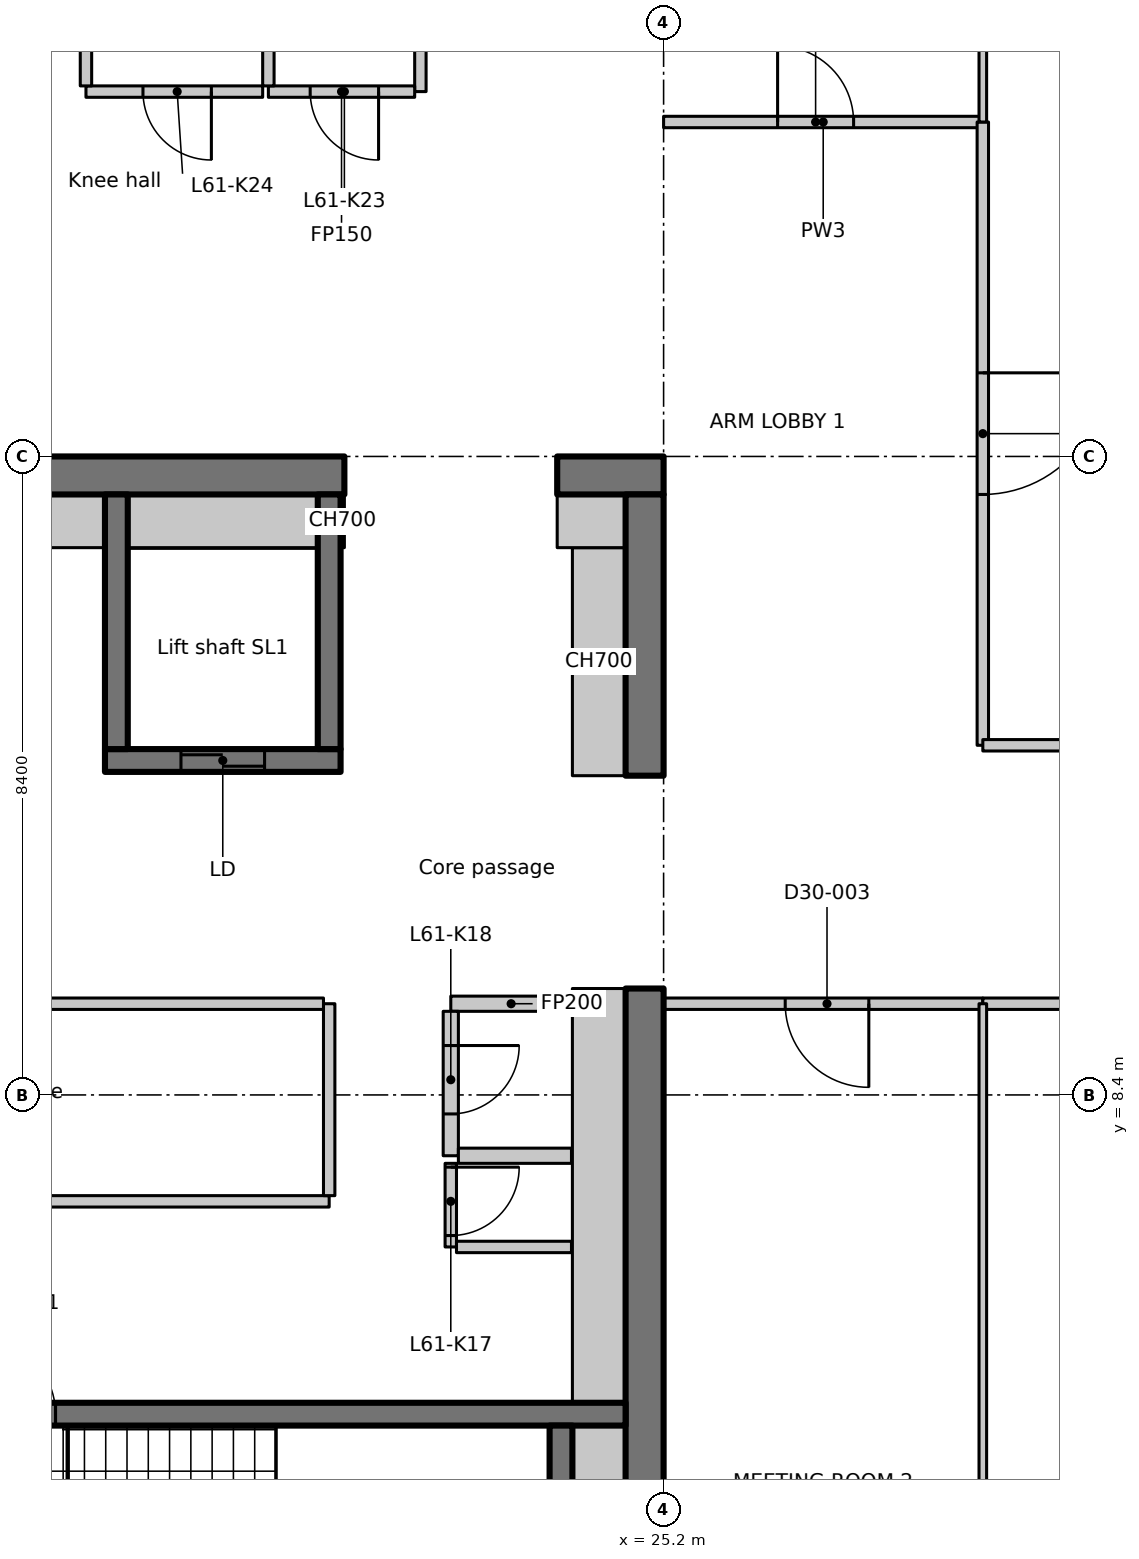
"""IFC4 building model, lengths in metres.
Left out: names, types, materials, properties, quantities, classifications, styles, units other than length and angle.
Written with IfcOpenShell. Run it as: python <this file> out.ifc"""

import sys

from ifc_helpers import new_model, si_unit, direction, frame, frame_2d, origin, place, context, subcontext, project, spatial, polyline, rectangle, outline, extrude, element, fill, save


model = new_model("IFC4")
c1 = context("Model", 3, precision=1e-05, world=origin(), true_north=direction((0.0, 1.0)))
c2 = subcontext(c1, "Body", "Model", "MODEL_VIEW")
j1 = project(units=[si_unit("LENGTHUNIT", "METRE"), si_unit("PLANEANGLEUNIT", "RADIAN")], contexts=[c1])
p1 = place(None, origin())
s1 = spatial("IfcSite", under=j1, at=p1, CompositionType="ELEMENT")
p2 = place(p1, origin())
s2 = spatial("IfcBuilding", under=s1, at=p2, CompositionType="ELEMENT")
p3 = place(p2, frame((0.0, 0.0, 240.9)))
s3 = spatial("IfcBuildingStorey", under=s2, at=p3, CompositionType="ELEMENT", Elevation=240.9)
p4 = place(p3, frame((-1.1, 16.55, 0.0), z_axis=(0.0, 0.0, 1.0), x_axis=(1.0, 0.0, 0.0)))
e1 = element("IfcWall", 1, at=p4, inside=s3, PredefinedType="SHEAR", context=c2, shape_type="SweptSolid", body=[
    extrude(rectangle(XDim=22.1, YDim=0.5, at=frame_2d((11.05, 0.0))), origin(), (0.0, 0.0, 1.0), 3.35),
])
p5 = place(p4, frame((3.15, 0.0, 0.0)))
e2 = element("IfcOpeningElement", 2, at=p5, cuts=e1, PredefinedType="OPENING", context=c2, shape_type="SweptSolid", body=[
    extrude(rectangle(XDim=1.1, YDim=2.3, at=frame_2d((0.55, 1.15))), frame((0.0, 0.26, 0.0), z_axis=(0.0, -1.0, 0.0), x_axis=(1.0, 0.0, 0.0)), (0.0, 0.0, 1.0), 0.52),
])
p6 = place(p3, frame((23.8, 16.55, 0.0), z_axis=(0.0, 0.0, 1.0), x_axis=(1.0, 0.0, 0.0)))
e3 = element("IfcWall", 3, at=p6, inside=s3, PredefinedType="SHEAR", context=c2, shape_type="SweptSolid", body=[
    extrude(rectangle(XDim=1.4, YDim=0.5, at=frame_2d((0.7, 0.0))), origin(), (0.0, 0.0, 1.0), 3.35),
])
p7 = place(p3, frame((24.95, 0.5, 0.0), z_axis=(0.0, 0.0, 1.0), x_axis=(0.0, 1.0, 0.0)))
e4 = element("IfcWall", 4, at=p7, inside=s3, PredefinedType="SHEAR", context=c2, shape_type="SweptSolid", body=[
    extrude(rectangle(XDim=9.3, YDim=0.5, at=frame_2d((4.65, 0.0))), origin(), (0.0, 0.0, 1.0), 3.35),
])
p8 = place(p3, frame((24.95, 12.6, 0.0), z_axis=(0.0, 0.0, 1.0), x_axis=(0.0, 1.0, 0.0)))
e5 = element("IfcWall", 5, at=p8, inside=s3, PredefinedType="SHEAR", context=c2, shape_type="SweptSolid", body=[
    extrude(rectangle(XDim=3.7, YDim=0.5, at=frame_2d((1.85, 0.0))), origin(), (0.0, 0.0, 1.0), 3.35),
])
p9 = place(p3, frame((24.35, 12.6, 0.0), z_axis=(0.0, 0.0, 1.0), x_axis=(0.0, 1.0, 0.0)))
e6 = element("IfcWall", 6, at=p9, inside=s3, PredefinedType="PARTITIONING", context=c2, shape_type="SweptSolid", body=[
    extrude(rectangle(XDim=3.0, YDim=0.7, at=frame_2d((1.5, 0.0))), origin(), (0.0, 0.0, 1.0), 3.35),
])
p10 = place(p3, frame((23.8, 15.95, 0.0), z_axis=(0.0, 0.0, 1.0), x_axis=(1.0, 0.0, 0.0)))
e7 = element("IfcWall", 7, at=p10, inside=s3, PredefinedType="PARTITIONING", context=c2, shape_type="SweptSolid", body=[
    extrude(rectangle(XDim=0.9, YDim=0.7, at=frame_2d((0.45, 0.0))), origin(), (0.0, 0.0, 1.0), 3.35),
])
p11 = place(p3, frame((17.85, 12.8, 0.0), z_axis=(0.0, 0.0, 1.0), x_axis=(1.0, 0.0, 0.0)))
e8 = element("IfcWall", 8, at=p11, inside=s3, PredefinedType="SHEAR", context=c2, shape_type="SweptSolid", body=[
    extrude(rectangle(XDim=3.1, YDim=0.3, at=frame_2d((1.55, 0.0))), origin(), (0.0, 0.0, 1.0), 3.35),
])
p12 = place(p11, frame((1.0, 0.0, 0.0)))
e9 = element("IfcOpeningElement", 9, at=p12, cuts=e8, PredefinedType="OPENING", context=c2, shape_type="SweptSolid", body=[
    extrude(rectangle(XDim=1.1, YDim=2.3, at=frame_2d((0.55, 1.15))), frame((0.0, 0.16, 0.0), z_axis=(0.0, -1.0, 0.0), x_axis=(1.0, 0.0, 0.0)), (0.0, 0.0, 1.0), 0.32),
])
for number, where, z_axis, x_axis in (
    (10, (18.0, 12.95, 0.0), (0.0, 0.0, 1.0), (0.0, 1.0, 0.0)),
    (11, (20.8, 12.95, 0.0), (0.0, 0.0, 1.0), (0.0, 1.0, 0.0)),
):
    element("IfcWall", number, at=place(p3, frame(where, z_axis=z_axis, x_axis=x_axis)), inside=s3, PredefinedType="SHEAR", context=c2, shape_type="SweptSolid", body=[
        extrude(rectangle(XDim=3.35, YDim=0.3, at=frame_2d((1.675, 0.0))), origin(), (0.0, 0.0, 1.0), 3.35),
    ])
p13 = place(p3, frame((15.8, 4.2, 0.0), z_axis=(0.0, 0.0, 1.0), x_axis=(1.0, 0.0, 0.0)))
e12 = element("IfcWall", 12, at=p13, inside=s3, PredefinedType="SHEAR", context=c2, shape_type="SweptSolid", body=[
    extrude(rectangle(XDim=8.9, YDim=0.3, at=frame_2d((4.45, 0.0))), origin(), (0.0, 0.0, 1.0), 3.35),
])
p14 = place(p13, frame((0.4, 0.0, 0.0)))
e13 = element("IfcOpeningElement", 13, at=p14, cuts=e12, PredefinedType="OPENING", context=c2, shape_type="SweptSolid", body=[
    extrude(rectangle(XDim=1.0, YDim=2.1, at=frame_2d((0.5, 1.05))), frame((0.0, 0.16, 0.0), z_axis=(0.0, -1.0, 0.0), x_axis=(1.0, 0.0, 0.0)), (0.0, 0.0, 1.0), 0.32),
])
p15 = place(p3, frame((23.85, 1.5, 0.0), z_axis=(0.0, 0.0, 1.0), x_axis=(0.0, 1.0, 0.0)))
e14 = element("IfcWall", 14, at=p15, inside=s3, PredefinedType="SHEAR", context=c2, shape_type="SweptSolid", body=[
    extrude(rectangle(XDim=2.55, YDim=0.3, at=frame_2d((1.275, 0.0))), origin(), (0.0, 0.0, 1.0), 3.35),
])
p16 = place(p3, frame((23.988, 9.6, 0.0), z_axis=(0.0, 0.0, 1.0), x_axis=(-1.0, 0.0, 0.0)))
e15 = element("IfcWall", 15, at=p16, inside=s3, PredefinedType="PARTITIONING", context=c2, shape_type="SweptSolid", body=[
    extrude(rectangle(XDim=1.588, YDim=0.2, at=frame_2d((0.794, 0.0))), origin(), (0.0, 0.0, 1.0), 3.35),
])
p17 = place(p3, frame((22.4, 9.5, 0.0), z_axis=(0.0, 0.0, 1.0), x_axis=(0.0, -1.0, 0.0)))
e16 = element("IfcWall", 16, at=p17, inside=s3, PredefinedType="PARTITIONING", context=c2, shape_type="SweptSolid", body=[
    extrude(rectangle(XDim=1.9, YDim=0.2, at=frame_2d((0.95, 0.0))), origin(), (0.0, 0.0, 1.0), 3.35),
])
p18 = place(p17, frame((0.45, 0.0, 0.0)))
e17 = element("IfcOpeningElement", 17, at=p18, cuts=e16, PredefinedType="OPENING", context=c2, shape_type="SweptSolid", body=[
    extrude(rectangle(XDim=0.9, YDim=2.1, at=frame_2d((0.45, 1.05))), frame((0.0, 0.11, 0.0), z_axis=(0.0, -1.0, 0.0), x_axis=(1.0, 0.0, 0.0)), (0.0, 0.0, 1.0), 0.22),
])
p19 = place(p3, frame((22.5, 7.6, 0.0), z_axis=(0.0, 0.0, 1.0), x_axis=(1.0, 0.0, 0.0)))
e18 = element("IfcWall", 18, at=p19, inside=s3, PredefinedType="PARTITIONING", context=c2, shape_type="SweptSolid", body=[
    extrude(rectangle(XDim=1.488, YDim=0.2, at=frame_2d((0.744, 0.0))), origin(), (0.0, 0.0, 1.0), 3.35),
])
p20 = place(p3, frame((12.5, 7.0, 0.0), z_axis=(0.0, 0.0, 1.0), x_axis=(1.0, 0.0, 0.0)))
e19 = element("IfcWall", 19, at=p20, inside=s3, PredefinedType="PARTITIONING", context=c2, shape_type="SweptSolid", body=[
    extrude(rectangle(XDim=8.3, YDim=0.15, at=frame_2d((4.15, 0.0))), origin(), (0.0, 0.0, 1.0), 3.35),
])
p21 = place(p3, frame((20.8, 7.075, 0.0), z_axis=(0.0, 0.0, 1.0), x_axis=(0.0, 1.0, 0.0)))
e20 = element("IfcWall", 20, at=p21, inside=s3, PredefinedType="PARTITIONING", context=c2, shape_type="SweptSolid", body=[
    extrude(rectangle(XDim=2.525, YDim=0.15, at=frame_2d((1.263, 0.0))), origin(), (0.0, 0.0, 1.0), 3.35),
])
p22 = place(p3, frame((20.725, 9.6, 0.0), z_axis=(0.0, 0.0, 1.0), x_axis=(-1.0, 0.0, 0.0)))
e21 = element("IfcWall", 21, at=p22, inside=s3, PredefinedType="PARTITIONING", context=c2, shape_type="SweptSolid", body=[
    extrude(rectangle(XDim=8.225, YDim=0.15, at=frame_2d((4.113, 0.0))), origin(), (0.0, 0.0, 1.0), 3.35),
])
p23 = place(p22, frame((3.675, 0.0, 0.0)))
e22 = element("IfcOpeningElement", 22, at=p23, cuts=e21, PredefinedType="OPENING", context=c2, shape_type="SweptSolid", body=[
    extrude(rectangle(XDim=0.9, YDim=2.1, at=frame_2d((0.45, 1.05))), frame((0.0, 0.085, 0.0), z_axis=(0.0, -1.0, 0.0), x_axis=(1.0, 0.0, 0.0)), (0.0, 0.0, 1.0), 0.17),
])
p24 = place(p3, frame((22.0, 23.925, 0.0), z_axis=(0.0, 0.0, 1.0), x_axis=(0.0, -1.0, 0.0)))
e23 = element("IfcWall", 23, at=p24, inside=s3, PredefinedType="PARTITIONING", context=c2, shape_type="SweptSolid", body=[
    extrude(rectangle(XDim=2.325, YDim=0.15, at=frame_2d((1.163, 0.0))), origin(), (0.0, 0.0, 1.0), 3.35),
])
p25 = place(p3, frame((21.925, 21.6, 0.0), z_axis=(0.0, 0.0, 1.0), x_axis=(-1.0, 0.0, 0.0)))
e24 = element("IfcWall", 24, at=p25, inside=s3, PredefinedType="PARTITIONING", context=c2, shape_type="SweptSolid", body=[
    extrude(rectangle(XDim=1.925, YDim=0.15, at=frame_2d((0.962, 0.0))), origin(), (0.0, 0.0, 1.0), 3.35),
])
p26 = place(p25, frame((0.475, 0.0, 0.0)))
e25 = element("IfcOpeningElement", 25, at=p26, cuts=e24, PredefinedType="OPENING", context=c2, shape_type="SweptSolid", body=[
    extrude(rectangle(XDim=0.9, YDim=2.1, at=frame_2d((0.45, 1.05))), frame((0.0, 0.085, 0.0), z_axis=(0.0, -1.0, 0.0), x_axis=(1.0, 0.0, 0.0)), (0.0, 0.0, 1.0), 0.17),
])
p27 = place(p3, frame((20.0, 21.675, 0.0), z_axis=(0.0, 0.0, 1.0), x_axis=(0.0, 1.0, 0.0)))
e26 = element("IfcWall", 26, at=p27, inside=s3, PredefinedType="PARTITIONING", context=c2, shape_type="SweptSolid", body=[
    extrude(rectangle(XDim=2.25, YDim=0.15, at=frame_2d((1.125, 0.0))), origin(), (0.0, 0.0, 1.0), 3.35),
])
p28 = place(p3, frame((19.925, 21.6, 0.0), z_axis=(0.0, 0.0, 1.0), x_axis=(-1.0, 0.0, 0.0)))
e27 = element("IfcWall", 27, at=p28, inside=s3, PredefinedType="PARTITIONING", context=c2, shape_type="SweptSolid", body=[
    extrude(rectangle(XDim=2.325, YDim=0.15, at=frame_2d((1.163, 0.0))), origin(), (0.0, 0.0, 1.0), 3.35),
])
p29 = place(p28, frame((0.675, 0.0, 0.0)))
e28 = element("IfcOpeningElement", 28, at=p29, cuts=e27, PredefinedType="OPENING", context=c2, shape_type="SweptSolid", body=[
    extrude(rectangle(XDim=0.9, YDim=2.1, at=frame_2d((0.45, 1.05))), frame((0.0, 0.085, 0.0), z_axis=(0.0, -1.0, 0.0), x_axis=(1.0, 0.0, 0.0)), (0.0, 0.0, 1.0), 0.17),
])
p30 = place(p3, frame((17.6, 21.675, 0.0), z_axis=(0.0, 0.0, 1.0), x_axis=(0.0, 1.0, 0.0)))
e29 = element("IfcWall", 29, at=p30, inside=s3, PredefinedType="PARTITIONING", context=c2, shape_type="SweptSolid", body=[
    extrude(rectangle(XDim=2.325, YDim=0.15, at=frame_2d((1.163, 0.0))), origin(), (0.0, 0.0, 1.0), 3.35),
])
p31 = place(p3, frame((22.4, 7.5, 0.0), z_axis=(0.0, 0.0, 1.0), x_axis=(0.0, -1.0, 0.0)))
e30 = element("IfcWall", 30, at=p31, inside=s3, PredefinedType="PARTITIONING", context=c2, shape_type="SweptSolid", body=[
    extrude(rectangle(XDim=1.1, YDim=0.15, at=frame_2d((0.55, 0.0))), origin(), (0.0, 0.0, 1.0), 3.35),
])
p32 = place(p31, frame((0.05, 0.0, 0.0)))
e31 = element("IfcOpeningElement", 31, at=p32, cuts=e30, PredefinedType="OPENING", context=c2, shape_type="SweptSolid", body=[
    extrude(rectangle(XDim=0.9, YDim=2.1, at=frame_2d((0.45, 1.05))), frame((0.0, 0.085, 0.0), z_axis=(0.0, -1.0, 0.0), x_axis=(1.0, 0.0, 0.0)), (0.0, 0.0, 1.0), 0.17),
])
p33 = place(p3, frame((22.475, 6.4, 0.0), z_axis=(0.0, 0.0, 1.0), x_axis=(1.0, 0.0, 0.0)))
e32 = element("IfcWall", 32, at=p33, inside=s3, PredefinedType="PARTITIONING", context=c2, shape_type="SweptSolid", body=[
    extrude(rectangle(XDim=1.513, YDim=0.15, at=frame_2d((0.756, 0.0))), origin(), (0.0, 0.0, 1.0), 3.35),
])
for number, where, z_axis, x_axis in (
    (33, (15.35, 15.95, 0.0), (0.0, 0.0, 1.0), (1.0, 0.0, 0.0)),
    (34, (18.15, 15.95, 0.0), (0.0, 0.0, 1.0), (1.0, 0.0, 0.0)),
):
    element("IfcWall", number, at=place(p3, frame(where, z_axis=z_axis, x_axis=x_axis)), inside=s3, PredefinedType="PARTITIONING", context=c2, shape_type="SweptSolid", body=[
        extrude(rectangle(XDim=2.5, YDim=0.7, at=frame_2d((1.25, 0.0))), origin(), (0.0, 0.0, 1.0), 3.35),
    ])
p34 = place(p3, frame((20.95, 15.95, 0.0), z_axis=(0.0, 0.0, 1.0), x_axis=(1.0, 0.0, 0.0)))
e35 = element("IfcWall", 35, at=p34, inside=s3, PredefinedType="PARTITIONING", context=c2, shape_type="SweptSolid", body=[
    extrude(rectangle(XDim=0.05, YDim=0.7, at=frame_2d((0.025, 0.0))), origin(), (0.0, 0.0, 1.0), 3.35),
])
p35 = place(p3, frame((24.35, 1.5, 0.0), z_axis=(0.0, 0.0, 1.0), x_axis=(0.0, 1.0, 0.0)))
e36 = element("IfcWall", 36, at=p35, inside=s3, PredefinedType="PARTITIONING", context=c2, shape_type="SweptSolid", body=[
    extrude(rectangle(XDim=2.55, YDim=0.7, at=frame_2d((1.275, 0.0))), origin(), (0.0, 0.0, 1.0), 3.35),
])
p36 = place(p3, frame((24.35, 4.35, 0.0), z_axis=(0.0, 0.0, 1.0), x_axis=(0.0, 1.0, 0.0)))
e37 = element("IfcWall", 37, at=p36, inside=s3, PredefinedType="PARTITIONING", context=c2, shape_type="SweptSolid", body=[
    extrude(rectangle(XDim=5.45, YDim=0.7, at=frame_2d((2.725, 0.0))), origin(), (0.0, 0.0, 1.0), 3.35),
])
p37 = place(p3, frame((25.2, 21.2, 0.0), z_axis=(0.0, 0.0, 1.0), x_axis=(1.0, 0.0, 0.0)))
e38 = element("IfcWall", 38, at=p37, inside=s3, PredefinedType="PARTITIONING", context=c2, shape_type="SweptSolid", body=[
    extrude(rectangle(XDim=4.2, YDim=0.15, at=frame_2d((2.1, 0.0))), origin(), (0.0, 0.0, 1.0), 3.33),
])
p38 = place(p37, frame((1.5, 0.0, 0.0)))
e39 = element("IfcOpeningElement", 39, at=p38, cuts=e38, PredefinedType="OPENING", context=c2, shape_type="SweptSolid", body=[
    extrude(rectangle(XDim=1.0, YDim=2.1, at=frame_2d((0.5, 1.05))), frame((0.0, 0.085, 0.0), z_axis=(0.0, -1.0, 0.0), x_axis=(1.0, 0.0, 0.0)), (0.0, 0.0, 1.0), 0.17),
])
p39 = place(p3, frame((29.4, 9.6, 0.0), z_axis=(0.0, 0.0, 1.0), x_axis=(-1.0, 0.0, 0.0)))
e40 = element("IfcWall", 40, at=p39, inside=s3, PredefinedType="PARTITIONING", context=c2, shape_type="SweptSolid", body=[
    extrude(rectangle(XDim=4.2, YDim=0.15, at=frame_2d((2.1, 0.0))), origin(), (0.0, 0.0, 1.0), 3.33),
])
p40 = place(p39, frame((1.5, 0.0, 0.0)))
e41 = element("IfcOpeningElement", 41, at=p40, cuts=e40, PredefinedType="OPENING", context=c2, shape_type="SweptSolid", body=[
    extrude(rectangle(XDim=1.1, YDim=2.1, at=frame_2d((0.55, 1.05))), frame((0.0, 0.085, 0.0), z_axis=(0.0, -1.0, 0.0), x_axis=(1.0, 0.0, 0.0)), (0.0, 0.0, 1.0), 0.17),
])
p41 = place(p3, frame((29.4, 21.2, 0.0), z_axis=(0.0, 0.0, 1.0), x_axis=(0.0, -1.0, 0.0)))
e42 = element("IfcWall", 42, at=p41, inside=s3, PredefinedType="PARTITIONING", context=c2, shape_type="SweptSolid", body=[
    extrude(rectangle(XDim=8.2, YDim=0.15, at=frame_2d((4.1, 0.0))), origin(), (0.0, 0.0, 1.0), 3.33),
])
p42 = place(p41, frame((3.3, 0.0, 0.0)))
e43 = element("IfcOpeningElement", 43, at=p42, cuts=e42, PredefinedType="OPENING", context=c2, shape_type="SweptSolid", body=[
    extrude(rectangle(XDim=1.6, YDim=2.1, at=frame_2d((0.8, 1.05))), frame((0.0, 0.085, 0.0), z_axis=(0.0, -1.0, 0.0), x_axis=(1.0, 0.0, 0.0)), (0.0, 0.0, 1.0), 0.17),
])
p43 = place(p3, frame((29.4, 27.511, 0.0), z_axis=(0.0, 0.0, 1.0), x_axis=(0.0, -1.0, 0.0)))
e44 = element("IfcWall", 44, at=p43, inside=s3, PredefinedType="PARTITIONING", context=c2, shape_type="SweptSolid", body=[
    extrude(outline(polyline([(0.0, 0.0), (6.311, 0.0), (6.311, 3.33), (2.761, 3.33), (2.759, 2.98), (1.863, 2.98), (1.861, 3.33), (0.236, 3.33), (0.0, 3.33), (0.0, 0.0)])), frame((0.0, 0.05, 0.0), z_axis=(0.0, -1.0, 0.0), x_axis=(1.0, 0.0, 0.0)), (0.0, 0.0, 1.0), 0.1),
])
p44 = place(p3, frame((46.2, 9.6, 0.0), z_axis=(0.0, 0.0, 1.0), x_axis=(-1.0, 0.0, 0.0)))
e45 = element("IfcWall", 45, at=p44, inside=s3, PredefinedType="PARTITIONING", context=c2, shape_type="SweptSolid", body=[
    extrude(rectangle(XDim=16.8, YDim=0.15, at=frame_2d((8.4, 0.0))), origin(), (0.0, 0.0, 1.0), 3.33),
])
p45 = place(p44, frame((7.5, 0.0, 0.0)))
e46 = element("IfcOpeningElement", 46, at=p45, cuts=e45, PredefinedType="OPENING", context=c2, shape_type="SweptSolid", body=[
    extrude(rectangle(XDim=2.0, YDim=2.4, at=frame_2d((1.0, 1.2))), frame((0.0, 0.085, 0.0), z_axis=(0.0, -1.0, 0.0), x_axis=(1.0, 0.0, 0.0)), (0.0, 0.0, 1.0), 0.17),
])
p46 = place(p3, frame((29.4, 13.0, 0.0), z_axis=(0.0, 0.0, 1.0), x_axis=(1.0, 0.0, 0.0)))
e47 = element("IfcWall", 47, at=p46, inside=s3, PredefinedType="PARTITIONING", context=c2, shape_type="SweptSolid", body=[
    extrude(rectangle(XDim=4.2, YDim=0.15, at=frame_2d((2.1, 0.0))), origin(), (0.0, 0.0, 1.0), 3.33),
])
p47 = place(p3, frame((29.4, 9.6, 0.0), z_axis=(0.0, 0.0, 1.0), x_axis=(0.0, -1.0, 0.0)))
e48 = element("IfcWall", 48, at=p47, inside=s3, PredefinedType="PARTITIONING", context=c2, shape_type="SweptSolid", body=[
    extrude(outline(polyline([(0.0, 0.0), (12.6, 0.0), (12.6, 3.33), (10.05, 3.33), (10.048, 2.98), (9.152, 2.98), (9.15, 3.33), (0.0, 3.33), (0.0, 0.0)])), frame((0.0, 0.05, 0.0), z_axis=(0.0, -1.0, 0.0), x_axis=(1.0, 0.0, 0.0)), (0.0, 0.0, 1.0), 0.1),
])
p48 = place(p12, origin())
e49 = element("IfcDoor", 49, at=p48, inside=s3, OperationType="SLIDING_TO_LEFT", PredefinedType="DOOR", context=c2, shape_type="SweptSolid", body=[
    extrude(rectangle(XDim=1.1, YDim=2.3, at=frame_2d((0.55, 1.15))), frame((0.0, 0.025, 0.0), z_axis=(0.0, -1.0, 0.0), x_axis=(1.0, 0.0, 0.0)), (0.0, 0.0, 1.0), 0.05),
])
fill(e9, e49)
p49 = place(p14, origin())
e50 = element("IfcDoor", 50, at=p49, inside=s3, OperationType="SINGLE_SWING_RIGHT", PredefinedType="DOOR", context=c2, shape_type="SweptSolid", body=[
    extrude(rectangle(XDim=1.0, YDim=2.1, at=frame_2d((0.5, 1.05))), frame((0.0, 0.025, 0.0), z_axis=(0.0, -1.0, 0.0), x_axis=(1.0, 0.0, 0.0)), (0.0, 0.0, 1.0), 0.05),
])
fill(e13, e50)
p50 = place(p32, origin())
e51 = element("IfcDoor", 51, at=p50, inside=s3, OperationType="SINGLE_SWING_RIGHT", PredefinedType="DOOR", context=c2, shape_type="SweptSolid", body=[
    extrude(rectangle(XDim=0.9, YDim=2.1, at=frame_2d((0.45, 1.05))), frame((0.0, 0.025, 0.0), z_axis=(0.0, -1.0, 0.0), x_axis=(1.0, 0.0, 0.0)), (0.0, 0.0, 1.0), 0.05),
])
fill(e31, e51)
p51 = place(p18, origin())
e52 = element("IfcDoor", 52, at=p51, inside=s3, OperationType="SINGLE_SWING_LEFT", PredefinedType="DOOR", context=c2, shape_type="SweptSolid", body=[
    extrude(rectangle(XDim=0.9, YDim=2.1, at=frame_2d((0.45, 1.05))), frame((0.0, 0.025, 0.0), z_axis=(0.0, -1.0, 0.0), x_axis=(1.0, 0.0, 0.0)), (0.0, 0.0, 1.0), 0.05),
])
fill(e17, e52)
p52 = place(p26, origin())
e53 = element("IfcDoor", 53, at=p52, inside=s3, OperationType="SINGLE_SWING_RIGHT", PredefinedType="DOOR", context=c2, shape_type="SweptSolid", body=[
    extrude(rectangle(XDim=0.9, YDim=2.1, at=frame_2d((0.45, 1.05))), frame((0.0, 0.025, 0.0), z_axis=(0.0, -1.0, 0.0), x_axis=(1.0, 0.0, 0.0)), (0.0, 0.0, 1.0), 0.05),
])
fill(e25, e53)
p53 = place(p29, origin())
e54 = element("IfcDoor", 54, at=p53, inside=s3, OperationType="SINGLE_SWING_LEFT", PredefinedType="DOOR", context=c2, shape_type="SweptSolid", body=[
    extrude(rectangle(XDim=0.9, YDim=2.1, at=frame_2d((0.45, 1.05))), frame((0.0, 0.025, 0.0), z_axis=(0.0, -1.0, 0.0), x_axis=(1.0, 0.0, 0.0)), (0.0, 0.0, 1.0), 0.05),
])
fill(e28, e54)
p54 = place(p38, origin())
e55 = element("IfcDoor", 55, at=p54, inside=s3, OperationType="SINGLE_SWING_LEFT", PredefinedType="DOOR", context=c2, shape_type="SweptSolid", body=[
    extrude(rectangle(XDim=1.0, YDim=2.1, at=frame_2d((0.5, 1.05))), frame((0.0, 0.025, 0.0), z_axis=(0.0, -1.0, 0.0), x_axis=(1.0, 0.0, 0.0)), (0.0, 0.0, 1.0), 0.05),
])
fill(e39, e55)
p55 = place(p40, origin())
e56 = element("IfcDoor", 56, at=p55, inside=s3, OperationType="SINGLE_SWING_LEFT", PredefinedType="DOOR", context=c2, shape_type="SweptSolid", body=[
    extrude(rectangle(XDim=1.1, YDim=2.1, at=frame_2d((0.55, 1.05))), frame((0.0, 0.025, 0.0), z_axis=(0.0, -1.0, 0.0), x_axis=(1.0, 0.0, 0.0)), (0.0, 0.0, 1.0), 0.05),
])
fill(e41, e56)
p56 = place(p42, origin())
e57 = element("IfcDoor", 57, at=p56, inside=s3, OperationType="DOUBLE_DOOR_SINGLE_SWING", PredefinedType="DOOR", context=c2, shape_type="SweptSolid", body=[
    extrude(rectangle(XDim=1.6, YDim=2.1, at=frame_2d((0.8, 1.05))), frame((0.0, 0.025, 0.0), z_axis=(0.0, -1.0, 0.0), x_axis=(1.0, 0.0, 0.0)), (0.0, 0.0, 1.0), 0.05),
])
fill(e43, e57)
save(model, sys.argv[1])
